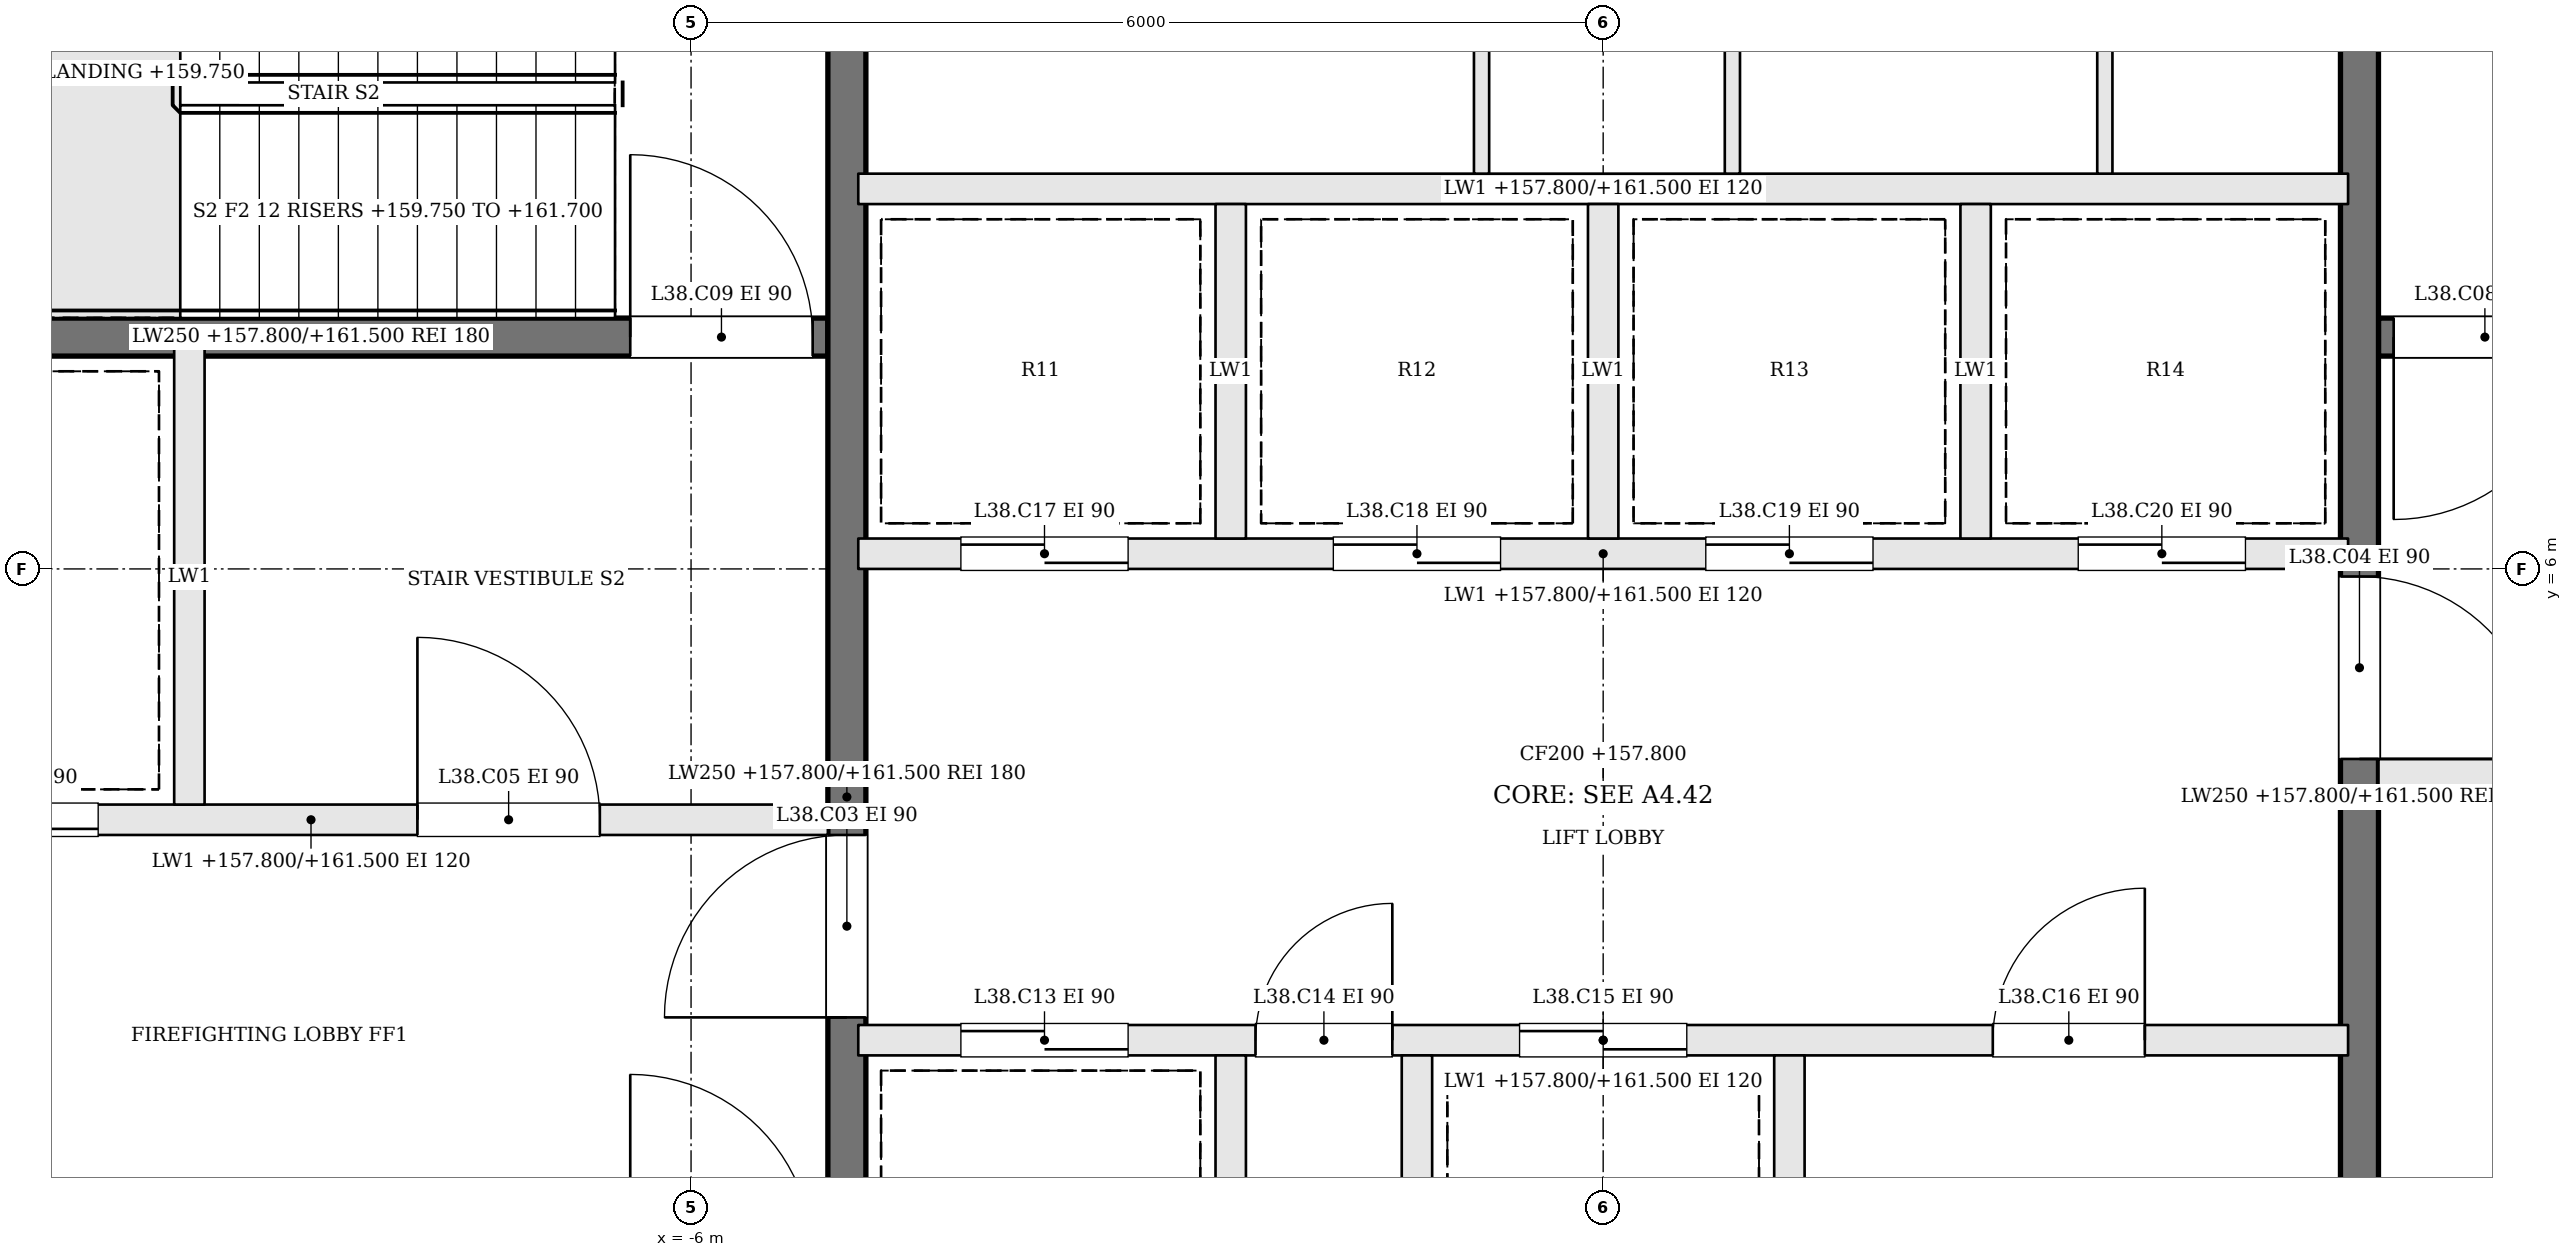
"""IFC4 building model, lengths in metres.
Left out: names, types, materials, properties, quantities, classifications, styles, units other than length and angle.
Written with IfcOpenShell. Run it as: python <this file> out.ifc"""

import sys

from ifc_helpers import new_model, si_unit, direction, frame, frame_2d, origin, place, context, subcontext, project, spatial, rectangle, extrude, element, fill, save


model = new_model("IFC4")
c1 = context("Model", 3, precision=1e-05, world=origin(), true_north=direction((0.0, 1.0)))
c2 = subcontext(c1, "Body", "Model", "MODEL_VIEW")
j1 = project(units=[si_unit("LENGTHUNIT", "METRE"), si_unit("PLANEANGLEUNIT", "RADIAN")], contexts=[c1])
p1 = place(None, origin())
s1 = spatial("IfcSite", under=j1, at=p1, CompositionType="ELEMENT")
p2 = place(p1, origin())
s2 = spatial("IfcBuilding", under=s1, at=p2, CompositionType="ELEMENT")
p3 = place(p2, frame((0.0, 0.0, 157.8)))
s3 = spatial("IfcBuildingStorey", under=s2, at=p3, CompositionType="ELEMENT", Elevation=157.8)
p4 = place(p3, frame((11.9, 7.525, 0.0), z_axis=(0.0, 0.0, 1.0), x_axis=(-1.0, 0.0, 0.0)))
e1 = element("IfcWall", 1, at=p4, inside=s3, PredefinedType="SOLIDWALL", context=c2, shape_type="SweptSolid", body=[
    extrude(rectangle(XDim=6.8, YDim=0.25, at=frame_2d((3.4, 0.0))), origin(), (0.0, 0.0, 1.0), 3.7),
])
p5 = place(p4, frame((5.5, 0.0, 0.0)))
e2 = element("IfcOpeningElement", 2, at=p5, cuts=e1, PredefinedType="OPENING", context=c2, shape_type="SweptSolid", body=[
    extrude(rectangle(XDim=1.2, YDim=2.1, at=frame_2d((0.6, 1.05))), frame((0.0, 0.135, 0.0), z_axis=(0.0, -1.0, 0.0), x_axis=(1.0, 0.0, 0.0)), (0.0, 0.0, 1.0), 0.27),
])
p6 = place(p3, frame((-11.9, 4.35, 0.0), z_axis=(0.0, 0.0, 1.0), x_axis=(1.0, 0.0, 0.0)))
e3 = element("IfcWall", 3, at=p6, inside=s3, PredefinedType="SOLIDWALL", context=c2, shape_type="SweptSolid", body=[
    extrude(rectangle(XDim=6.8, YDim=0.2, at=frame_2d((3.4, 0.0))), origin(), (0.0, 0.0, 1.0), 3.7),
])
p7 = place(p6, frame((4.1, 0.0, 0.0)))
e4 = element("IfcOpeningElement", 4, at=p7, cuts=e3, PredefinedType="OPENING", context=c2, shape_type="SweptSolid", body=[
    extrude(rectangle(XDim=1.2, YDim=2.1, at=frame_2d((0.6, 1.05))), frame((0.0, 0.11, 0.0), z_axis=(0.0, -1.0, 0.0), x_axis=(1.0, 0.0, 0.0)), (0.0, 0.0, 1.0), 0.22),
])
p8 = place(p6, frame((0.8, 0.0, 0.0)))
e5 = element("IfcOpeningElement", 5, at=p8, cuts=e3, PredefinedType="OPENING", context=c2, shape_type="SweptSolid", body=[
    extrude(rectangle(XDim=1.2, YDim=2.1, at=frame_2d((0.6, 1.05))), frame((0.0, 0.11, 0.0), z_axis=(0.0, -1.0, 0.0), x_axis=(1.0, 0.0, 0.0)), (0.0, 0.0, 1.0), 0.22),
])
p9 = place(p3, frame((11.9, 4.65, 0.0), z_axis=(0.0, 0.0, 1.0), x_axis=(-1.0, 0.0, 0.0)))
e6 = element("IfcWall", 6, at=p9, inside=s3, PredefinedType="SOLIDWALL", context=c2, shape_type="SweptSolid", body=[
    extrude(rectangle(XDim=6.8, YDim=0.2, at=frame_2d((3.4, 0.0))), origin(), (0.0, 0.0, 1.0), 3.7),
])
p10 = place(p9, frame((4.1, 0.0, 0.0)))
e7 = element("IfcOpeningElement", 7, at=p10, cuts=e6, PredefinedType="OPENING", context=c2, shape_type="SweptSolid", body=[
    extrude(rectangle(XDim=1.2, YDim=2.1, at=frame_2d((0.6, 1.05))), frame((0.0, 0.11, 0.0), z_axis=(0.0, -1.0, 0.0), x_axis=(1.0, 0.0, 0.0)), (0.0, 0.0, 1.0), 0.22),
])
p11 = place(p9, frame((0.8, 0.0, 0.0)))
e8 = element("IfcOpeningElement", 8, at=p11, cuts=e6, PredefinedType="OPENING", context=c2, shape_type="SweptSolid", body=[
    extrude(rectangle(XDim=1.2, YDim=2.1, at=frame_2d((0.6, 1.05))), frame((0.0, 0.11, 0.0), z_axis=(0.0, -1.0, 0.0), x_axis=(1.0, 0.0, 0.0)), (0.0, 0.0, 1.0), 0.22),
])
p12 = place(p3, frame((-11.9, 7.525, 0.0), z_axis=(0.0, 0.0, 1.0), x_axis=(1.0, 0.0, 0.0)))
e9 = element("IfcWall", 9, at=p12, inside=s3, PredefinedType="SOLIDWALL", context=c2, shape_type="SweptSolid", body=[
    extrude(rectangle(XDim=6.8, YDim=0.25, at=frame_2d((3.4, 0.0))), origin(), (0.0, 0.0, 1.0), 3.7),
])
p13 = place(p12, frame((5.5, 0.0, 0.0)))
e10 = element("IfcOpeningElement", 10, at=p13, cuts=e9, PredefinedType="OPENING", context=c2, shape_type="SweptSolid", body=[
    extrude(rectangle(XDim=1.2, YDim=2.1, at=frame_2d((0.6, 1.05))), frame((0.0, 0.135, 0.0), z_axis=(0.0, -1.0, 0.0), x_axis=(1.0, 0.0, 0.0)), (0.0, 0.0, 1.0), 0.27),
])
p14 = place(p3, frame((-9.3, 4.45, 0.0), z_axis=(0.0, 0.0, 1.0), x_axis=(0.0, 1.0, 0.0)))
e11 = element("IfcWall", 11, at=p14, inside=s3, PredefinedType="SOLIDWALL", context=c2, shape_type="SweptSolid", body=[
    extrude(rectangle(XDim=3.0, YDim=0.2, at=frame_2d((1.5, 0.0))), origin(), (0.0, 0.0, 1.0), 3.7),
])
p15 = place(p3, frame((-4.975, -1.9, 0.0), z_axis=(0.0, 0.0, 1.0), x_axis=(0.0, 1.0, 0.0)))
e12 = element("IfcWall", 12, at=p15, inside=s3, PredefinedType="SOLIDWALL", context=c2, shape_type="SweptSolid", body=[
    extrude(rectangle(XDim=12.8, YDim=0.25, at=frame_2d((6.4, 0.0))), origin(), (0.0, 0.0, 1.0), 3.7),
])
p16 = place(p15, frame((4.95, 0.0, 0.0)))
e13 = element("IfcOpeningElement", 13, at=p16, cuts=e12, PredefinedType="OPENING", context=c2, shape_type="SweptSolid", body=[
    extrude(rectangle(XDim=1.2, YDim=2.1, at=frame_2d((0.6, 1.05))), frame((0.0, 0.135, 0.0), z_axis=(0.0, -1.0, 0.0), x_axis=(1.0, 0.0, 0.0)), (0.0, 0.0, 1.0), 0.27),
])
p17 = place(p3, frame((4.975, 10.9, 0.0), z_axis=(0.0, 0.0, 1.0), x_axis=(0.0, -1.0, 0.0)))
e14 = element("IfcWall", 14, at=p17, inside=s3, PredefinedType="SOLIDWALL", context=c2, shape_type="SweptSolid", body=[
    extrude(rectangle(XDim=12.8, YDim=0.25, at=frame_2d((6.4, 0.0))), origin(), (0.0, 0.0, 1.0), 3.7),
])
p18 = place(p17, frame((4.95, 0.0, 0.0)))
e15 = element("IfcOpeningElement", 15, at=p18, cuts=e14, PredefinedType="OPENING", context=c2, shape_type="SweptSolid", body=[
    extrude(rectangle(XDim=1.2, YDim=2.1, at=frame_2d((0.6, 1.05))), frame((0.0, 0.135, 0.0), z_axis=(0.0, -1.0, 0.0), x_axis=(1.0, 0.0, 0.0)), (0.0, 0.0, 1.0), 0.27),
])
p19 = place(p3, frame((-4.9, 2.9, 0.0), z_axis=(0.0, 0.0, 1.0), x_axis=(1.0, 0.0, 0.0)))
e16 = element("IfcWall", 16, at=p19, inside=s3, PredefinedType="SOLIDWALL", context=c2, shape_type="SweptSolid", body=[
    extrude(rectangle(XDim=9.8, YDim=0.2, at=frame_2d((4.9, 0.0))), origin(), (0.0, 0.0, 1.0), 3.7),
])
p20 = place(p19, frame((0.675, 0.0, 0.0)))
e17 = element("IfcOpeningElement", 17, at=p20, cuts=e16, PredefinedType="OPENING", context=c2, shape_type="SweptSolid", body=[
    extrude(rectangle(XDim=1.1, YDim=2.1, at=frame_2d((0.55, 1.05))), frame((0.0, 0.11, 0.0), z_axis=(0.0, -1.0, 0.0), x_axis=(1.0, 0.0, 0.0)), (0.0, 0.0, 1.0), 0.22),
])
p21 = place(p19, frame((2.613, 0.0, 0.0)))
e18 = element("IfcOpeningElement", 18, at=p21, cuts=e16, PredefinedType="OPENING", context=c2, shape_type="SweptSolid", body=[
    extrude(rectangle(XDim=0.9, YDim=2.1, at=frame_2d((0.45, 1.05))), frame((0.0, 0.11, 0.0), z_axis=(0.0, -1.0, 0.0), x_axis=(1.0, 0.0, 0.0)), (0.0, 0.0, 1.0), 0.22),
])
p22 = place(p19, frame((4.35, 0.0, 0.0)))
e19 = element("IfcOpeningElement", 19, at=p22, cuts=e16, PredefinedType="OPENING", context=c2, shape_type="SweptSolid", body=[
    extrude(rectangle(XDim=1.1, YDim=2.1, at=frame_2d((0.55, 1.05))), frame((0.0, 0.11, 0.0), z_axis=(0.0, -1.0, 0.0), x_axis=(1.0, 0.0, 0.0)), (0.0, 0.0, 1.0), 0.22),
])
p23 = place(p19, frame((7.463, 0.0, 0.0)))
e20 = element("IfcOpeningElement", 20, at=p23, cuts=e16, PredefinedType="OPENING", context=c2, shape_type="SweptSolid", body=[
    extrude(rectangle(XDim=1.0, YDim=2.1, at=frame_2d((0.5, 1.05))), frame((0.0, 0.11, 0.0), z_axis=(0.0, -1.0, 0.0), x_axis=(1.0, 0.0, 0.0)), (0.0, 0.0, 1.0), 0.22),
])
p24 = place(p3, frame((-4.9, 6.1, 0.0), z_axis=(0.0, 0.0, 1.0), x_axis=(1.0, 0.0, 0.0)))
e21 = element("IfcWall", 21, at=p24, inside=s3, PredefinedType="SOLIDWALL", context=c2, shape_type="SweptSolid", body=[
    extrude(rectangle(XDim=9.8, YDim=0.2, at=frame_2d((4.9, 0.0))), origin(), (0.0, 0.0, 1.0), 3.7),
])
p25 = place(p24, frame((0.675, 0.0, 0.0)))
e22 = element("IfcOpeningElement", 22, at=p25, cuts=e21, PredefinedType="OPENING", context=c2, shape_type="SweptSolid", body=[
    extrude(rectangle(XDim=1.1, YDim=2.1, at=frame_2d((0.55, 1.05))), frame((0.0, 0.11, 0.0), z_axis=(0.0, -1.0, 0.0), x_axis=(1.0, 0.0, 0.0)), (0.0, 0.0, 1.0), 0.22),
])
p26 = place(p24, frame((3.125, 0.0, 0.0)))
e23 = element("IfcOpeningElement", 23, at=p26, cuts=e21, PredefinedType="OPENING", context=c2, shape_type="SweptSolid", body=[
    extrude(rectangle(XDim=1.1, YDim=2.1, at=frame_2d((0.55, 1.05))), frame((0.0, 0.11, 0.0), z_axis=(0.0, -1.0, 0.0), x_axis=(1.0, 0.0, 0.0)), (0.0, 0.0, 1.0), 0.22),
])
p27 = place(p24, frame((5.575, 0.0, 0.0)))
e24 = element("IfcOpeningElement", 24, at=p27, cuts=e21, PredefinedType="OPENING", context=c2, shape_type="SweptSolid", body=[
    extrude(rectangle(XDim=1.1, YDim=2.1, at=frame_2d((0.55, 1.05))), frame((0.0, 0.11, 0.0), z_axis=(0.0, -1.0, 0.0), x_axis=(1.0, 0.0, 0.0)), (0.0, 0.0, 1.0), 0.22),
])
p28 = place(p24, frame((8.025, 0.0, 0.0)))
e25 = element("IfcOpeningElement", 25, at=p28, cuts=e21, PredefinedType="OPENING", context=c2, shape_type="SweptSolid", body=[
    extrude(rectangle(XDim=1.1, YDim=2.1, at=frame_2d((0.55, 1.05))), frame((0.0, 0.11, 0.0), z_axis=(0.0, -1.0, 0.0), x_axis=(1.0, 0.0, 0.0)), (0.0, 0.0, 1.0), 0.22),
])
p29 = place(p3, frame((-4.9, 8.5, 0.0), z_axis=(0.0, 0.0, 1.0), x_axis=(1.0, 0.0, 0.0)))
e26 = element("IfcWall", 26, at=p29, inside=s3, PredefinedType="SOLIDWALL", context=c2, shape_type="SweptSolid", body=[
    extrude(rectangle(XDim=9.8, YDim=0.2, at=frame_2d((4.9, 0.0))), origin(), (0.0, 0.0, 1.0), 3.7),
])
for number, where, z_axis, x_axis in (
    (27, (-2.45, 0.6, 0.0), (0.0, 0.0, 1.0), (0.0, 1.0, 0.0)),
    (28, (-1.225, 0.6, 0.0), (0.0, 0.0, 1.0), (0.0, 1.0, 0.0)),
    (29, (1.225, 0.6, 0.0), (0.0, 0.0, 1.0), (0.0, 1.0, 0.0)),
    (30, (-2.45, 6.2, 0.0), (0.0, 0.0, 1.0), (0.0, 1.0, 0.0)),
    (31, (0.0, 6.2, 0.0), (0.0, 0.0, 1.0), (0.0, 1.0, 0.0)),
    (32, (2.45, 6.2, 0.0), (0.0, 0.0, 1.0), (0.0, 1.0, 0.0)),
):
    element("IfcWall", number, at=place(p3, frame(where, z_axis=z_axis, x_axis=x_axis)), inside=s3, PredefinedType="SOLIDWALL", context=c2, shape_type="SweptSolid", body=[
        extrude(rectangle(XDim=2.2, YDim=0.2, at=frame_2d((1.1, 0.0))), origin(), (0.0, 0.0, 1.0), 3.7),
    ])
for number, where, z_axis, x_axis in (
    (33, (-0.8, 8.6, 0.0), (0.0, 0.0, 1.0), (0.0, 1.0, 0.0)),
    (34, (0.85, 8.6, 0.0), (0.0, 0.0, 1.0), (0.0, 1.0, 0.0)),
    (35, (3.3, 8.6, 0.0), (0.0, 0.0, 1.0), (0.0, 1.0, 0.0)),
):
    element("IfcWall", number, at=place(p3, frame(where, z_axis=z_axis, x_axis=x_axis)), inside=s3, PredefinedType="PARTITIONING", context=c2, shape_type="SweptSolid", body=[
        extrude(rectangle(XDim=2.3, YDim=0.1, at=frame_2d((1.15, 0.0))), origin(), (0.0, 0.0, 1.0), 3.7),
    ])
p30 = place(p16, origin())
e36 = element("IfcDoor", 36, at=p30, inside=s3, OperationType="SINGLE_SWING_LEFT", PredefinedType="DOOR", context=c2, shape_type="SweptSolid", body=[
    extrude(rectangle(XDim=1.2, YDim=2.1, at=frame_2d((0.6, 1.05))), frame((0.0, 0.025, 0.0), z_axis=(0.0, -1.0, 0.0), x_axis=(1.0, 0.0, 0.0)), (0.0, 0.0, 1.0), 0.05),
])
fill(e13, e36)
p31 = place(p18, origin())
e37 = element("IfcDoor", 37, at=p31, inside=s3, OperationType="SINGLE_SWING_RIGHT", PredefinedType="DOOR", context=c2, shape_type="SweptSolid", body=[
    extrude(rectangle(XDim=1.2, YDim=2.1, at=frame_2d((0.6, 1.05))), frame((0.0, 0.025, 0.0), z_axis=(0.0, -1.0, 0.0), x_axis=(1.0, 0.0, 0.0)), (0.0, 0.0, 1.0), 0.05),
])
fill(e15, e37)
p32 = place(p7, origin())
e38 = element("IfcDoor", 38, at=p32, inside=s3, OperationType="SINGLE_SWING_LEFT", PredefinedType="DOOR", context=c2, shape_type="SweptSolid", body=[
    extrude(rectangle(XDim=1.2, YDim=2.1, at=frame_2d((0.6, 1.05))), frame((0.0, 0.025, 0.0), z_axis=(0.0, -1.0, 0.0), x_axis=(1.0, 0.0, 0.0)), (0.0, 0.0, 1.0), 0.05),
])
fill(e4, e38)
p33 = place(p5, origin())
e39 = element("IfcDoor", 39, at=p33, inside=s3, OperationType="SINGLE_SWING_RIGHT", PredefinedType="DOOR", context=c2, shape_type="SweptSolid", body=[
    extrude(rectangle(XDim=1.2, YDim=2.1, at=frame_2d((0.6, 1.05))), frame((0.0, 0.025, 0.0), z_axis=(0.0, -1.0, 0.0), x_axis=(1.0, 0.0, 0.0)), (0.0, 0.0, 1.0), 0.05),
])
fill(e2, e39)
p34 = place(p13, origin())
e40 = element("IfcDoor", 40, at=p34, inside=s3, OperationType="SINGLE_SWING_LEFT", PredefinedType="DOOR", context=c2, shape_type="SweptSolid", body=[
    extrude(rectangle(XDim=1.2, YDim=2.1, at=frame_2d((0.6, 1.05))), frame((0.0, 0.025, 0.0), z_axis=(0.0, -1.0, 0.0), x_axis=(1.0, 0.0, 0.0)), (0.0, 0.0, 1.0), 0.05),
])
fill(e10, e40)
p35 = place(p8, origin())
e41 = element("IfcDoor", 41, at=p35, inside=s3, OperationType="SLIDING_TO_RIGHT", PredefinedType="DOOR", context=c2, shape_type="SweptSolid", body=[
    extrude(rectangle(XDim=1.2, YDim=2.1, at=frame_2d((0.6, 1.05))), frame((0.0, 0.025, 0.0), z_axis=(0.0, -1.0, 0.0), x_axis=(1.0, 0.0, 0.0)), (0.0, 0.0, 1.0), 0.05),
])
fill(e5, e41)
p36 = place(p20, origin())
e42 = element("IfcDoor", 42, at=p36, inside=s3, OperationType="SLIDING_TO_RIGHT", PredefinedType="DOOR", context=c2, shape_type="SweptSolid", body=[
    extrude(rectangle(XDim=1.1, YDim=2.1, at=frame_2d((0.55, 1.05))), frame((0.0, 0.025, 0.0), z_axis=(0.0, -1.0, 0.0), x_axis=(1.0, 0.0, 0.0)), (0.0, 0.0, 1.0), 0.05),
])
fill(e17, e42)
p37 = place(p21, origin())
e43 = element("IfcDoor", 43, at=p37, inside=s3, OperationType="SINGLE_SWING_RIGHT", PredefinedType="DOOR", context=c2, shape_type="SweptSolid", body=[
    extrude(rectangle(XDim=0.9, YDim=2.1, at=frame_2d((0.45, 1.05))), frame((0.0, 0.025, 0.0), z_axis=(0.0, -1.0, 0.0), x_axis=(1.0, 0.0, 0.0)), (0.0, 0.0, 1.0), 0.05),
])
fill(e18, e43)
p38 = place(p22, origin())
e44 = element("IfcDoor", 44, at=p38, inside=s3, OperationType="SLIDING_TO_LEFT", PredefinedType="DOOR", context=c2, shape_type="SweptSolid", body=[
    extrude(rectangle(XDim=1.1, YDim=2.1, at=frame_2d((0.55, 1.05))), frame((0.0, 0.025, 0.0), z_axis=(0.0, -1.0, 0.0), x_axis=(1.0, 0.0, 0.0)), (0.0, 0.0, 1.0), 0.05),
])
fill(e19, e44)
p39 = place(p23, origin())
e45 = element("IfcDoor", 45, at=p39, inside=s3, OperationType="SINGLE_SWING_RIGHT", PredefinedType="DOOR", context=c2, shape_type="SweptSolid", body=[
    extrude(rectangle(XDim=1.0, YDim=2.1, at=frame_2d((0.5, 1.05))), frame((0.0, 0.025, 0.0), z_axis=(0.0, -1.0, 0.0), x_axis=(1.0, 0.0, 0.0)), (0.0, 0.0, 1.0), 0.05),
])
fill(e20, e45)
p40 = place(p25, origin())
e46 = element("IfcDoor", 46, at=p40, inside=s3, OperationType="SLIDING_TO_RIGHT", PredefinedType="DOOR", context=c2, shape_type="SweptSolid", body=[
    extrude(rectangle(XDim=1.1, YDim=2.1, at=frame_2d((0.55, 1.05))), frame((0.0, 0.025, 0.0), z_axis=(0.0, -1.0, 0.0), x_axis=(1.0, 0.0, 0.0)), (0.0, 0.0, 1.0), 0.05),
])
fill(e22, e46)
p41 = place(p26, origin())
e47 = element("IfcDoor", 47, at=p41, inside=s3, OperationType="SLIDING_TO_LEFT", PredefinedType="DOOR", context=c2, shape_type="SweptSolid", body=[
    extrude(rectangle(XDim=1.1, YDim=2.1, at=frame_2d((0.55, 1.05))), frame((0.0, 0.025, 0.0), z_axis=(0.0, -1.0, 0.0), x_axis=(1.0, 0.0, 0.0)), (0.0, 0.0, 1.0), 0.05),
])
fill(e23, e47)
p42 = place(p27, origin())
e48 = element("IfcDoor", 48, at=p42, inside=s3, OperationType="SLIDING_TO_RIGHT", PredefinedType="DOOR", context=c2, shape_type="SweptSolid", body=[
    extrude(rectangle(XDim=1.1, YDim=2.1, at=frame_2d((0.55, 1.05))), frame((0.0, 0.025, 0.0), z_axis=(0.0, -1.0, 0.0), x_axis=(1.0, 0.0, 0.0)), (0.0, 0.0, 1.0), 0.05),
])
fill(e24, e48)
p43 = place(p28, origin())
e49 = element("IfcDoor", 49, at=p43, inside=s3, OperationType="SLIDING_TO_LEFT", PredefinedType="DOOR", context=c2, shape_type="SweptSolid", body=[
    extrude(rectangle(XDim=1.1, YDim=2.1, at=frame_2d((0.55, 1.05))), frame((0.0, 0.025, 0.0), z_axis=(0.0, -1.0, 0.0), x_axis=(1.0, 0.0, 0.0)), (0.0, 0.0, 1.0), 0.05),
])
fill(e25, e49)
save(model, sys.argv[1])
